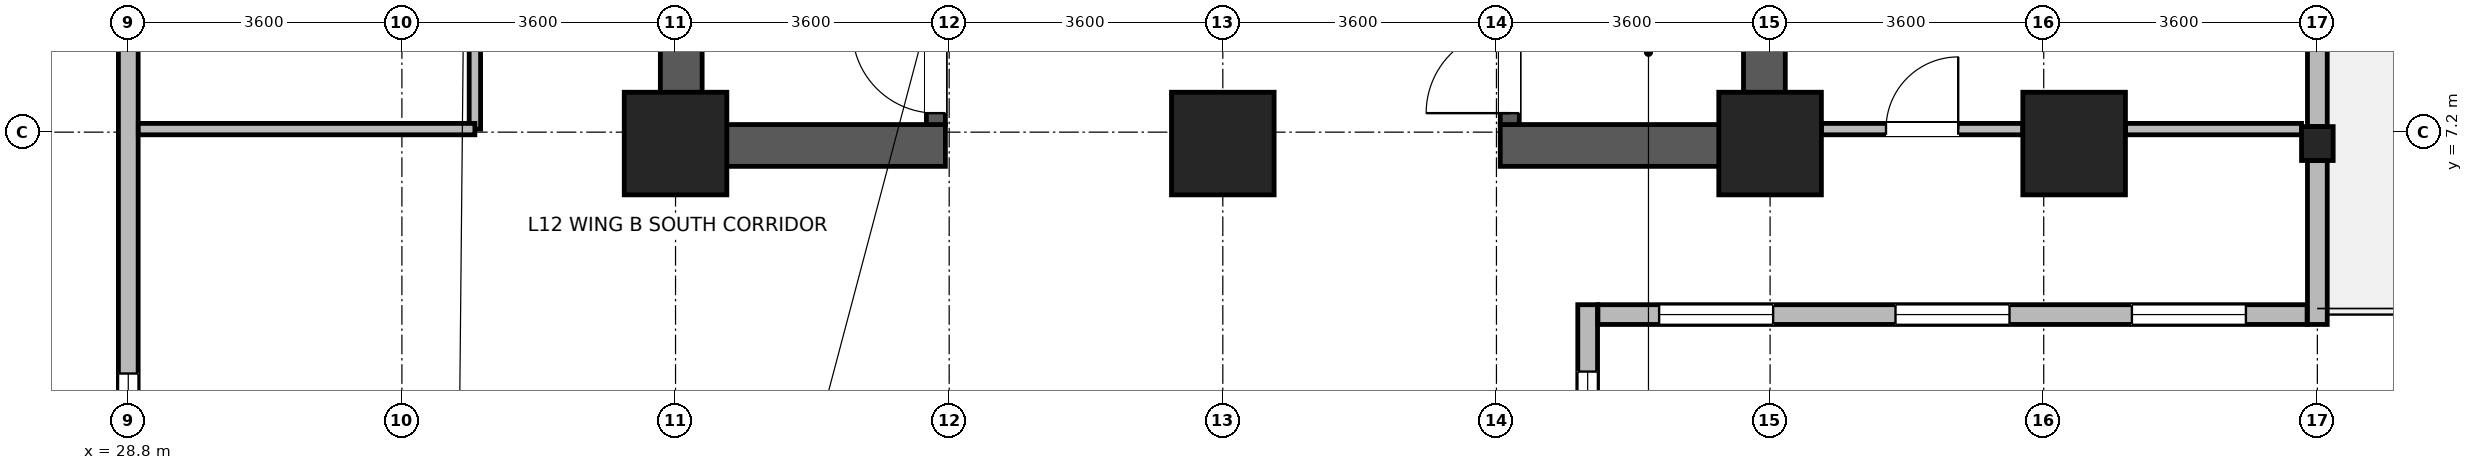
"""IFC4 building model, lengths in metres.
Left out: names, types, materials, properties, quantities, classifications, styles, units other than length and angle.
Written with IfcOpenShell. Run it as: python <this file> out.ifc"""

import sys

from ifc_helpers import new_model, si_unit, direction, frame, frame_2d, origin, origin_2d, place, context, subcontext, project, spatial, rectangle, i_section, extrude, source, transform, mapped, element, fill, save


model = new_model("IFC4")
c1 = context("Model", 3, precision=1e-05, world=origin(), true_north=direction((0.0, 1.0)))
c2 = subcontext(c1, "Body", "Model", "MODEL_VIEW")
j1 = project(units=[si_unit("LENGTHUNIT", "METRE"), si_unit("PLANEANGLEUNIT", "RADIAN")], contexts=[c1])
p1 = place(None, origin())
s1 = spatial("IfcSite", under=j1, at=p1, CompositionType="ELEMENT")
p2 = place(p1, origin())
s2 = spatial("IfcBuilding", under=s1, at=p2, CompositionType="ELEMENT")
p3 = place(p2, frame((0.0, 0.0, 51.2)))
s3 = spatial("IfcBuildingStorey", under=s2, at=p3, CompositionType="ELEMENT", Elevation=51.2)
for number, where, z_axis, x_axis in (
    (1, (36.075, 6.75, 0.0), (0.0, 0.0, 1.0), (0.0, 1.0, 0.0)),
    (2, (50.325, 6.75, 0.0), (0.0, 0.0, 1.0), (0.0, 1.0, 0.0)),
):
    element("IfcWall", number, at=place(p3, frame(where, z_axis=z_axis, x_axis=x_axis)), inside=s3, PredefinedType="SHEAR", context=c2, shape_type="SweptSolid", body=[
        extrude(rectangle(XDim=8.1, YDim=0.55, at=frame_2d((4.05, 0.0))), origin(), (0.0, 0.0, 1.0), 3.45),
    ])
for number, where, z_axis, x_axis in (
    (3, (36.35, 7.025, 0.0), (0.0, 0.0, 1.0), (1.0, 0.0, 0.0)),
    (4, (46.85, 7.025, 0.0), (0.0, 0.0, 1.0), (1.0, 0.0, 0.0)),
):
    element("IfcWall", number, at=place(p3, frame(where, z_axis=z_axis, x_axis=x_axis)), inside=s3, PredefinedType="SHEAR", context=c2, shape_type="SweptSolid", body=[
        extrude(rectangle(XDim=3.2, YDim=0.55, at=frame_2d((1.6, 0.0))), origin(), (0.0, 0.0, 1.0), 3.45),
    ])
p4 = place(p3, frame((39.425, 7.3, 0.0), z_axis=(0.0, 0.0, 1.0), x_axis=(0.0, 1.0, 0.0)))
e5 = element("IfcWall", 5, at=p4, inside=s3, PredefinedType="SHEAR", context=c2, shape_type="SweptSolid", body=[
    extrude(rectangle(XDim=7.0, YDim=0.25, at=frame_2d((3.5, 0.0))), origin(), (0.0, 0.0, 1.0), 3.45),
])
p5 = place(p4, frame((0.15, 0.0, 0.0)))
e6 = element("IfcOpeningElement", 6, at=p5, cuts=e5, PredefinedType="OPENING", context=c2, shape_type="SweptSolid", body=[
    extrude(rectangle(XDim=1.1, YDim=2.08, at=frame_2d((0.55, 1.04))), frame((0.0, 0.135, 0.0), z_axis=(0.0, -1.0, 0.0), x_axis=(1.0, 0.0, 0.0)), (0.0, 0.0, 1.0), 0.27),
])
p6 = place(p3, frame((46.975, 7.3, 0.0), z_axis=(0.0, 0.0, 1.0), x_axis=(0.0, 1.0, 0.0)))
e7 = element("IfcWall", 7, at=p6, inside=s3, PredefinedType="SHEAR", context=c2, shape_type="SweptSolid", body=[
    extrude(rectangle(XDim=7.0, YDim=0.25, at=frame_2d((3.5, 0.0))), origin(), (0.0, 0.0, 1.0), 3.45),
])
p7 = place(p6, frame((0.15, 0.0, 0.0)))
e8 = element("IfcOpeningElement", 8, at=p7, cuts=e7, PredefinedType="OPENING", context=c2, shape_type="SweptSolid", body=[
    extrude(rectangle(XDim=1.1, YDim=2.08, at=frame_2d((0.55, 1.04))), frame((0.0, 0.135, 0.0), z_axis=(0.0, -1.0, 0.0), x_axis=(1.0, 0.0, 0.0)), (0.0, 0.0, 1.0), 0.27),
])
m1 = source(origin(), c2, "Body", "SweptSolid", [
    extrude(rectangle(XDim=1.35, YDim=1.35, at=origin_2d()), origin(), (0.0, 0.0, 1.0), 3.7),
])
for number, where, z_axis, x_axis in (
    (9, (36.0, 7.05, 0.0), (0.0, 0.0, 1.0), (1.0, 0.0, 0.0)),
    (10, (43.2, 7.05, 0.0), (0.0, 0.0, 1.0), (1.0, 0.0, 0.0)),
    (11, (50.4, 7.05, 0.0), (0.0, 0.0, 1.0), (1.0, 0.0, 0.0)),
    (12, (54.4, 7.05, 0.0), (0.0, 0.0, 1.0), (1.0, 0.0, 0.0)),
):
    element("IfcColumn", number, at=place(p3, frame(where, z_axis=z_axis, x_axis=x_axis)), inside=s3, PredefinedType="COLUMN", context=c2, shape_type="MappedRepresentation", body=[
        mapped(m1, transform((0.0, 0.0, 0.0), x_axis=(1.0, 0.0, 0.0), y_axis=(0.0, 1.0, 0.0), z_axis=(0.0, 0.0, 1.0), scale=1.0)),
    ])
m2 = source(origin(), c2, "Body", "SweptSolid", [
    extrude(i_section(OverallWidth=0.416, OverallDepth=0.446, WebThickness=0.029, FlangeThickness=0.04, FilletRadius=0.015, at=origin_2d()), origin(), (0.0, 0.0, 1.0), 3.7),
])
p8 = place(p3, frame((57.6, 7.05, 0.0), z_axis=(0.0, 0.0, 1.0), x_axis=(1.0, 0.0, 0.0)))
e13 = element("IfcColumn", 13, at=p8, inside=s3, PredefinedType="COLUMN", context=c2, shape_type="MappedRepresentation", body=[
    mapped(m2, transform((0.0, 0.0, 0.0), x_axis=(1.0, 0.0, 0.0), y_axis=(0.0, 1.0, 0.0), z_axis=(0.0, 0.0, 1.0), scale=1.0)),
])
p9 = place(p3, frame((48.0, 4.93, 0.0), z_axis=(0.0, 0.0, 1.0), x_axis=(0.0, -1.0, 0.0)))
e14 = element("IfcWall", 14, at=p9, inside=s3, PredefinedType="STANDARD", context=c2, shape_type="SweptSolid", body=[
    extrude(rectangle(XDim=3.26, YDim=0.26, at=frame_2d((1.63, 0.0))), origin(), (0.0, 0.0, 1.0), 3.43),
])
p10 = place(p9, frame((0.88, 0.0, 0.85)))
e15 = element("IfcOpeningElement", 15, at=p10, cuts=e14, PredefinedType="OPENING", context=c2, shape_type="SweptSolid", body=[
    extrude(rectangle(XDim=1.5, YDim=1.85, at=frame_2d((0.75, 0.925))), frame((0.0, 0.14, 0.0), z_axis=(0.0, -1.0, 0.0), x_axis=(1.0, 0.0, 0.0)), (0.0, 0.0, 1.0), 0.28),
])
p11 = place(p3, frame((57.465, 4.8, 0.0), z_axis=(0.0, 0.0, 1.0), x_axis=(-1.0, 0.0, 0.0)))
e16 = element("IfcWall", 16, at=p11, inside=s3, PredefinedType="STANDARD", context=c2, shape_type="SweptSolid", body=[
    extrude(rectangle(XDim=9.33, YDim=0.26, at=frame_2d((4.665, 0.0))), origin(), (0.0, 0.0, 1.0), 3.43),
])
p12 = place(p11, frame((0.805, 0.0, 0.85)))
e17 = element("IfcOpeningElement", 17, at=p12, cuts=e16, PredefinedType="OPENING", context=c2, shape_type="SweptSolid", body=[
    extrude(rectangle(XDim=1.5, YDim=1.85, at=frame_2d((0.75, 0.925))), frame((0.0, 0.14, 0.0), z_axis=(0.0, -1.0, 0.0), x_axis=(1.0, 0.0, 0.0)), (0.0, 0.0, 1.0), 0.28),
])
p13 = place(p11, frame((3.915, 0.0, 0.85)))
e18 = element("IfcOpeningElement", 18, at=p13, cuts=e16, PredefinedType="OPENING", context=c2, shape_type="SweptSolid", body=[
    extrude(rectangle(XDim=1.5, YDim=1.85, at=frame_2d((0.75, 0.925))), frame((0.0, 0.14, 0.0), z_axis=(0.0, -1.0, 0.0), x_axis=(1.0, 0.0, 0.0)), (0.0, 0.0, 1.0), 0.28),
])
p14 = place(p11, frame((7.025, 0.0, 0.85)))
e19 = element("IfcOpeningElement", 19, at=p14, cuts=e16, PredefinedType="OPENING", context=c2, shape_type="SweptSolid", body=[
    extrude(rectangle(XDim=1.5, YDim=1.85, at=frame_2d((0.75, 0.925))), frame((0.0, 0.14, 0.0), z_axis=(0.0, -1.0, 0.0), x_axis=(1.0, 0.0, 0.0)), (0.0, 0.0, 1.0), 0.28),
])
p15 = place(p3, frame((57.6, 6.826, 0.0), z_axis=(0.0, 0.0, 1.0), x_axis=(0.0, -1.0, 0.0)))
e20 = element("IfcWall", 20, at=p15, inside=s3, PredefinedType="STANDARD", context=c2, shape_type="SweptSolid", body=[
    extrude(rectangle(XDim=2.156, YDim=0.26, at=frame_2d((1.078, 0.0))), origin(), (0.0, 0.0, 1.0), 3.43),
])
p16 = place(p3, frame((57.6, 14.326, 0.0), z_axis=(0.0, 0.0, 1.0), x_axis=(0.0, -1.0, 0.0)))
e21 = element("IfcWall", 21, at=p16, inside=s3, PredefinedType="STANDARD", context=c2, shape_type="SweptSolid", body=[
    extrude(rectangle(XDim=7.052, YDim=0.26, at=frame_2d((3.526, 0.0))), origin(), (0.0, 0.0, 1.0), 2.93),
])
p17 = place(p16, frame((2.776, 0.0, 0.0)))
e22 = element("IfcOpeningElement", 22, at=p17, cuts=e21, PredefinedType="OPENING", context=c2, shape_type="SweptSolid", body=[
    extrude(rectangle(XDim=1.5, YDim=2.15, at=frame_2d((0.75, 1.075))), frame((0.0, 0.14, 0.0), z_axis=(0.0, -1.0, 0.0), x_axis=(1.0, 0.0, 0.0)), (0.0, 0.0, 1.0), 0.28),
])
p18 = place(p16, frame((1.013, 0.0, 0.85)))
e23 = element("IfcOpeningElement", 23, at=p18, cuts=e21, PredefinedType="OPENING", context=c2, shape_type="SweptSolid", body=[
    extrude(rectangle(XDim=1.5, YDim=1.85, at=frame_2d((0.75, 0.925))), frame((0.0, 0.14, 0.0), z_axis=(0.0, -1.0, 0.0), x_axis=(1.0, 0.0, 0.0)), (0.0, 0.0, 1.0), 0.28),
])
p19 = place(p16, frame((4.539, 0.0, 0.85)))
e24 = element("IfcOpeningElement", 24, at=p19, cuts=e21, PredefinedType="OPENING", context=c2, shape_type="SweptSolid", body=[
    extrude(rectangle(XDim=1.5, YDim=1.85, at=frame_2d((0.75, 0.925))), frame((0.0, 0.14, 0.0), z_axis=(0.0, -1.0, 0.0), x_axis=(1.0, 0.0, 0.0)), (0.0, 0.0, 1.0), 0.28),
])
p20 = place(p3, frame((28.8, 1.67, 0.0), z_axis=(0.0, 0.0, 1.0), x_axis=(0.0, 1.0, 0.0)))
e25 = element("IfcWall", 25, at=p20, inside=s3, PredefinedType="STANDARD", context=c2, shape_type="SweptSolid", body=[
    extrude(rectangle(XDim=19.254, YDim=0.26, at=frame_2d((9.627, 0.0))), origin(), (0.0, 0.0, 1.0), 3.43),
])
p21 = place(p20, frame((0.854, 0.0, 0.85)))
e26 = element("IfcOpeningElement", 26, at=p21, cuts=e25, PredefinedType="OPENING", context=c2, shape_type="SweptSolid", body=[
    extrude(rectangle(XDim=1.5, YDim=1.85, at=frame_2d((0.75, 0.925))), frame((0.0, 0.14, 0.0), z_axis=(0.0, -1.0, 0.0), x_axis=(1.0, 0.0, 0.0)), (0.0, 0.0, 1.0), 0.28),
])
p22 = place(p20, frame((7.272, 0.0, 0.85)))
e27 = element("IfcOpeningElement", 27, at=p22, cuts=e25, PredefinedType="OPENING", context=c2, shape_type="SweptSolid", body=[
    extrude(rectangle(XDim=1.5, YDim=1.85, at=frame_2d((0.75, 0.925))), frame((0.0, 0.14, 0.0), z_axis=(0.0, -1.0, 0.0), x_axis=(1.0, 0.0, 0.0)), (0.0, 0.0, 1.0), 0.28),
])
p23 = place(p20, frame((10.481, 0.0, 0.85)))
e28 = element("IfcOpeningElement", 28, at=p23, cuts=e25, PredefinedType="OPENING", context=c2, shape_type="SweptSolid", body=[
    extrude(rectangle(XDim=1.5, YDim=1.85, at=frame_2d((0.75, 0.925))), frame((0.0, 0.14, 0.0), z_axis=(0.0, -1.0, 0.0), x_axis=(1.0, 0.0, 0.0)), (0.0, 0.0, 1.0), 0.28),
])
p24 = place(p20, frame((13.69, 0.0, 0.85)))
e29 = element("IfcOpeningElement", 29, at=p24, cuts=e25, PredefinedType="OPENING", context=c2, shape_type="SweptSolid", body=[
    extrude(rectangle(XDim=1.5, YDim=1.85, at=frame_2d((0.75, 0.925))), frame((0.0, 0.14, 0.0), z_axis=(0.0, -1.0, 0.0), x_axis=(1.0, 0.0, 0.0)), (0.0, 0.0, 1.0), 0.28),
])
p25 = place(p20, frame((16.899, 0.0, 0.85)))
e30 = element("IfcOpeningElement", 30, at=p25, cuts=e25, PredefinedType="OPENING", context=c2, shape_type="SweptSolid", body=[
    extrude(rectangle(XDim=1.5, YDim=1.85, at=frame_2d((0.75, 0.925))), frame((0.0, 0.14, 0.0), z_axis=(0.0, -1.0, 0.0), x_axis=(1.0, 0.0, 0.0)), (0.0, 0.0, 1.0), 0.28),
])
p26 = place(p3, frame((33.36, 7.24, 0.0), z_axis=(0.0, 0.0, 1.0), x_axis=(0.0, 1.0, 0.0)))
e31 = element("IfcWall", 31, at=p26, inside=s3, PredefinedType="PARTITIONING", context=c2, shape_type="SweptSolid", body=[
    extrude(rectangle(XDim=7.26, YDim=0.15, at=frame_2d((3.63, 0.0))), origin(), (0.0, 0.0, 1.0), 3.43),
])
p27 = place(p26, frame((2.98, 0.0, 0.0)))
e32 = element("IfcOpeningElement", 32, at=p27, cuts=e31, PredefinedType="OPENING", context=c2, shape_type="SweptSolid", body=[
    extrude(rectangle(XDim=1.3, YDim=2.12, at=frame_2d((0.65, 1.06))), frame((0.0, 0.085, 0.0), z_axis=(0.0, -1.0, 0.0), x_axis=(1.0, 0.0, 0.0)), (0.0, 0.0, 1.0), 0.17),
])
p28 = place(p3, frame((51.075, 7.24, 0.0), z_axis=(0.0, 0.0, 1.0), x_axis=(1.0, 0.0, 0.0)))
e33 = element("IfcWall", 33, at=p28, inside=s3, PredefinedType="PARTITIONING", context=c2, shape_type="SweptSolid", body=[
    extrude(rectangle(XDim=2.65, YDim=0.15, at=frame_2d((1.325, 0.0))), origin(), (0.0, 0.0, 1.0), 2.78),
])
p29 = place(p28, frame((0.85, 0.0, 0.0)))
e34 = element("IfcOpeningElement", 34, at=p29, cuts=e33, PredefinedType="OPENING", context=c2, shape_type="SweptSolid", body=[
    extrude(rectangle(XDim=0.95, YDim=2.1, at=frame_2d((0.475, 1.05))), frame((0.0, 0.085, 0.0), z_axis=(0.0, -1.0, 0.0), x_axis=(1.0, 0.0, 0.0)), (0.0, 0.0, 1.0), 0.17),
])
p30 = place(p3, frame((55.075, 7.24, 0.0), z_axis=(0.0, 0.0, 1.0), x_axis=(1.0, 0.0, 0.0)))
e35 = element("IfcWall", 35, at=p30, inside=s3, PredefinedType="PARTITIONING", context=c2, shape_type="SweptSolid", body=[
    extrude(rectangle(XDim=2.317, YDim=0.15, at=frame_2d((1.159, 0.0))), origin(), (0.0, 0.0, 1.0), 2.78),
])
p31 = place(p3, frame((28.932, 7.24, 0.0), z_axis=(0.0, 0.0, 1.0), x_axis=(1.0, 0.0, 0.0)))
e36 = element("IfcWall", 36, at=p31, inside=s3, PredefinedType="PARTITIONING", context=c2, shape_type="SweptSolid", body=[
    extrude(rectangle(XDim=4.428, YDim=0.15, at=frame_2d((2.214, 0.0))), origin(), (0.0, 0.0, 1.0), 3.43),
])
p32 = place(p10, origin())
e37 = element("IfcWindow", 37, at=p32, inside=s3, PartitioningType="SINGLE_PANEL", PredefinedType="WINDOW", context=c2, shape_type="SweptSolid", body=[
    extrude(rectangle(XDim=1.5, YDim=1.85, at=frame_2d((0.75, 0.925))), frame((0.0, 0.03, 0.0), z_axis=(0.0, -1.0, 0.0), x_axis=(1.0, 0.0, 0.0)), (0.0, 0.0, 1.0), 0.06),
])
fill(e15, e37)
p33 = place(p12, origin())
e38 = element("IfcWindow", 38, at=p33, inside=s3, PartitioningType="SINGLE_PANEL", PredefinedType="WINDOW", context=c2, shape_type="SweptSolid", body=[
    extrude(rectangle(XDim=1.5, YDim=1.85, at=frame_2d((0.75, 0.925))), frame((0.0, 0.03, 0.0), z_axis=(0.0, -1.0, 0.0), x_axis=(1.0, 0.0, 0.0)), (0.0, 0.0, 1.0), 0.06),
])
fill(e17, e38)
p34 = place(p13, origin())
e39 = element("IfcWindow", 39, at=p34, inside=s3, PartitioningType="SINGLE_PANEL", PredefinedType="WINDOW", context=c2, shape_type="SweptSolid", body=[
    extrude(rectangle(XDim=1.5, YDim=1.85, at=frame_2d((0.75, 0.925))), frame((0.0, 0.03, 0.0), z_axis=(0.0, -1.0, 0.0), x_axis=(1.0, 0.0, 0.0)), (0.0, 0.0, 1.0), 0.06),
])
fill(e18, e39)
p35 = place(p14, origin())
e40 = element("IfcWindow", 40, at=p35, inside=s3, PartitioningType="SINGLE_PANEL", PredefinedType="WINDOW", context=c2, shape_type="SweptSolid", body=[
    extrude(rectangle(XDim=1.5, YDim=1.85, at=frame_2d((0.75, 0.925))), frame((0.0, 0.03, 0.0), z_axis=(0.0, -1.0, 0.0), x_axis=(1.0, 0.0, 0.0)), (0.0, 0.0, 1.0), 0.06),
])
fill(e19, e40)
p36 = place(p21, origin())
e41 = element("IfcWindow", 41, at=p36, inside=s3, PartitioningType="SINGLE_PANEL", PredefinedType="WINDOW", context=c2, shape_type="SweptSolid", body=[
    extrude(rectangle(XDim=1.5, YDim=1.85, at=frame_2d((0.75, 0.925))), frame((0.0, 0.03, 0.0), z_axis=(0.0, -1.0, 0.0), x_axis=(1.0, 0.0, 0.0)), (0.0, 0.0, 1.0), 0.06),
])
fill(e26, e41)
p37 = place(p5, origin())
e42 = element("IfcDoor", 42, at=p37, inside=s3, OperationType="SINGLE_SWING_RIGHT", PredefinedType="DOOR", context=c2, shape_type="SweptSolid", body=[
    extrude(rectangle(XDim=1.1, YDim=2.08, at=frame_2d((0.55, 1.04))), frame((0.0, 0.025, 0.0), z_axis=(0.0, -1.0, 0.0), x_axis=(1.0, 0.0, 0.0)), (0.0, 0.0, 1.0), 0.05),
])
fill(e6, e42)
p38 = place(p7, origin())
e43 = element("IfcDoor", 43, at=p38, inside=s3, OperationType="SINGLE_SWING_LEFT", PredefinedType="DOOR", context=c2, shape_type="SweptSolid", body=[
    extrude(rectangle(XDim=1.1, YDim=2.08, at=frame_2d((0.55, 1.04))), frame((0.0, 0.025, 0.0), z_axis=(0.0, -1.0, 0.0), x_axis=(1.0, 0.0, 0.0)), (0.0, 0.0, 1.0), 0.05),
])
fill(e8, e43)
p39 = place(p29, origin())
e44 = element("IfcDoor", 44, at=p39, inside=s3, OperationType="SINGLE_SWING_RIGHT", PredefinedType="DOOR", context=c2, shape_type="SweptSolid", body=[
    extrude(rectangle(XDim=0.95, YDim=2.1, at=frame_2d((0.475, 1.05))), frame((0.0, 0.025, 0.0), z_axis=(0.0, -1.0, 0.0), x_axis=(1.0, 0.0, 0.0)), (0.0, 0.0, 1.0), 0.05),
])
fill(e34, e44)
save(model, sys.argv[1])
